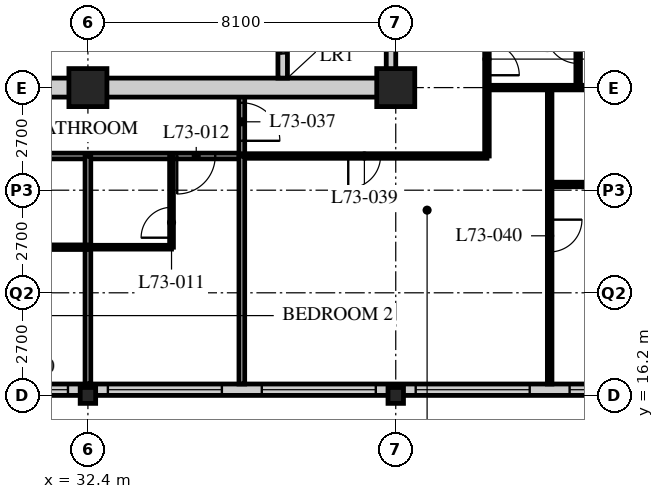
"""IFC4 building model, lengths in metres.
Left out: names, types, materials, properties, quantities, classifications, styles, units other than length and angle.
Written with IfcOpenShell. Run it as: python <this file> out.ifc"""

import sys

from ifc_helpers import new_model, si_unit, direction, frame, frame_2d, origin, origin_2d, place, context, subcontext, project, spatial, rectangle, hollow_rectangle, i_section, extrude, element, fill, save


model = new_model("IFC4")
c1 = context("Model", 3, precision=1e-05, world=origin(), true_north=direction((0.0, 1.0)))
c2 = subcontext(c1, "Body", "Model", "MODEL_VIEW")
j1 = project(units=[si_unit("LENGTHUNIT", "METRE"), si_unit("PLANEANGLEUNIT", "RADIAN")], contexts=[c1])
p1 = place(None, origin())
s1 = spatial("IfcSite", under=j1, at=p1, CompositionType="ELEMENT")
p2 = place(p1, origin())
s2 = spatial("IfcBuilding", under=s1, at=p2, CompositionType="ELEMENT")
p3 = place(p2, frame((0.0, 0.0, 285.3)))
s3 = spatial("IfcBuildingStorey", under=s2, at=p3, CompositionType="ELEMENT", Elevation=285.3)
p4 = place(p3, frame((32.4, 16.2, 0.0), z_axis=(0.0, 0.0, 1.0), x_axis=(1.0, 0.0, 0.0)))
e1 = element("IfcColumn", 1, at=p4, inside=s3, PredefinedType="COLUMN", context=c2, shape_type="SweptSolid", body=[
    extrude(i_section(OverallWidth=0.407, OverallDepth=0.419, WebThickness=0.031, FlangeThickness=0.049, FilletRadius=0.015, at=origin_2d()), origin(), (0.0, 0.0, 1.0), 3.9),
])
p5 = place(p3, frame((32.4, 24.3, 0.0), z_axis=(0.0, 0.0, 1.0), x_axis=(1.0, 0.0, 0.0)))
e2 = element("IfcColumn", 2, at=p5, inside=s3, PredefinedType="COLUMN", context=c2, shape_type="SweptSolid", body=[
    extrude(hollow_rectangle(XDim=1.0, YDim=1.0, WallThickness=0.1, at=origin_2d()), origin(), (0.0, 0.0, 1.0), 3.9),
])
p6 = place(p3, frame((40.5, 16.2, 0.0), z_axis=(0.0, 0.0, 1.0), x_axis=(1.0, 0.0, 0.0)))
e3 = element("IfcColumn", 3, at=p6, inside=s3, PredefinedType="COLUMN", context=c2, shape_type="SweptSolid", body=[
    extrude(i_section(OverallWidth=0.407, OverallDepth=0.419, WebThickness=0.031, FlangeThickness=0.049, FilletRadius=0.015, at=origin_2d()), origin(), (0.0, 0.0, 1.0), 3.9),
])
p7 = place(p3, frame((40.5, 24.3, 0.0), z_axis=(0.0, 0.0, 1.0), x_axis=(1.0, 0.0, 0.0)))
e4 = element("IfcColumn", 4, at=p7, inside=s3, PredefinedType="COLUMN", context=c2, shape_type="SweptSolid", body=[
    extrude(hollow_rectangle(XDim=1.0, YDim=1.0, WallThickness=0.1, at=origin_2d()), origin(), (0.0, 0.0, 1.0), 3.9),
])
p8 = place(p3, frame((8.4, 16.35, 0.0), z_axis=(0.0, 0.0, 1.0), x_axis=(1.0, 0.0, 0.0)))
e5 = element("IfcWall", 5, at=p8, inside=s3, PredefinedType="SOLIDWALL", context=c2, shape_type="SweptSolid", body=[
    extrude(rectangle(XDim=40.2, YDim=0.3, at=frame_2d((20.1, 0.0))), origin(), (0.0, 0.0, 1.0), 3.69),
])
p9 = place(p8, frame((0.225, 0.0, 0.6)))
e6 = element("IfcOpeningElement", 6, at=p9, cuts=e5, PredefinedType="OPENING", context=c2, shape_type="SweptSolid", body=[
    extrude(rectangle(XDim=3.0, YDim=2.4, at=frame_2d((1.5, 1.2))), frame((0.0, 0.16, 0.0), z_axis=(0.0, -1.0, 0.0), x_axis=(1.0, 0.0, 0.0)), (0.0, 0.0, 1.0), 0.32),
])
p10 = place(p8, frame((4.275, 0.0, 0.6)))
e7 = element("IfcOpeningElement", 7, at=p10, cuts=e5, PredefinedType="OPENING", context=c2, shape_type="SweptSolid", body=[
    extrude(rectangle(XDim=3.0, YDim=2.4, at=frame_2d((1.5, 1.2))), frame((0.0, 0.16, 0.0), z_axis=(0.0, -1.0, 0.0), x_axis=(1.0, 0.0, 0.0)), (0.0, 0.0, 1.0), 0.32),
])
p11 = place(p8, frame((8.325, 0.0, 0.6)))
e8 = element("IfcOpeningElement", 8, at=p11, cuts=e5, PredefinedType="OPENING", context=c2, shape_type="SweptSolid", body=[
    extrude(rectangle(XDim=3.0, YDim=2.4, at=frame_2d((1.5, 1.2))), frame((0.0, 0.16, 0.0), z_axis=(0.0, -1.0, 0.0), x_axis=(1.0, 0.0, 0.0)), (0.0, 0.0, 1.0), 0.32),
])
p12 = place(p8, frame((12.375, 0.0, 0.6)))
e9 = element("IfcOpeningElement", 9, at=p12, cuts=e5, PredefinedType="OPENING", context=c2, shape_type="SweptSolid", body=[
    extrude(rectangle(XDim=3.0, YDim=2.4, at=frame_2d((1.5, 1.2))), frame((0.0, 0.16, 0.0), z_axis=(0.0, -1.0, 0.0), x_axis=(1.0, 0.0, 0.0)), (0.0, 0.0, 1.0), 0.32),
])
p13 = place(p8, frame((16.425, 0.0, 0.6)))
e10 = element("IfcOpeningElement", 10, at=p13, cuts=e5, PredefinedType="OPENING", context=c2, shape_type="SweptSolid", body=[
    extrude(rectangle(XDim=3.0, YDim=2.4, at=frame_2d((1.5, 1.2))), frame((0.0, 0.16, 0.0), z_axis=(0.0, -1.0, 0.0), x_axis=(1.0, 0.0, 0.0)), (0.0, 0.0, 1.0), 0.32),
])
p14 = place(p8, frame((20.475, 0.0, 0.6)))
e11 = element("IfcOpeningElement", 11, at=p14, cuts=e5, PredefinedType="OPENING", context=c2, shape_type="SweptSolid", body=[
    extrude(rectangle(XDim=3.0, YDim=2.4, at=frame_2d((1.5, 1.2))), frame((0.0, 0.16, 0.0), z_axis=(0.0, -1.0, 0.0), x_axis=(1.0, 0.0, 0.0)), (0.0, 0.0, 1.0), 0.32),
])
p15 = place(p8, frame((24.525, 0.0, 0.6)))
e12 = element("IfcOpeningElement", 12, at=p15, cuts=e5, PredefinedType="OPENING", context=c2, shape_type="SweptSolid", body=[
    extrude(rectangle(XDim=3.0, YDim=2.4, at=frame_2d((1.5, 1.2))), frame((0.0, 0.16, 0.0), z_axis=(0.0, -1.0, 0.0), x_axis=(1.0, 0.0, 0.0)), (0.0, 0.0, 1.0), 0.32),
])
p16 = place(p8, frame((28.575, 0.0, 0.6)))
e13 = element("IfcOpeningElement", 13, at=p16, cuts=e5, PredefinedType="OPENING", context=c2, shape_type="SweptSolid", body=[
    extrude(rectangle(XDim=3.0, YDim=2.4, at=frame_2d((1.5, 1.2))), frame((0.0, 0.16, 0.0), z_axis=(0.0, -1.0, 0.0), x_axis=(1.0, 0.0, 0.0)), (0.0, 0.0, 1.0), 0.32),
])
p17 = place(p8, frame((32.625, 0.0, 0.6)))
e14 = element("IfcOpeningElement", 14, at=p17, cuts=e5, PredefinedType="OPENING", context=c2, shape_type="SweptSolid", body=[
    extrude(rectangle(XDim=3.0, YDim=2.4, at=frame_2d((1.5, 1.2))), frame((0.0, 0.16, 0.0), z_axis=(0.0, -1.0, 0.0), x_axis=(1.0, 0.0, 0.0)), (0.0, 0.0, 1.0), 0.32),
])
p18 = place(p8, frame((36.675, 0.0, 0.6)))
e15 = element("IfcOpeningElement", 15, at=p18, cuts=e5, PredefinedType="OPENING", context=c2, shape_type="SweptSolid", body=[
    extrude(rectangle(XDim=3.0, YDim=2.4, at=frame_2d((1.5, 1.2))), frame((0.0, 0.16, 0.0), z_axis=(0.0, -1.0, 0.0), x_axis=(1.0, 0.0, 0.0)), (0.0, 0.0, 1.0), 0.32),
])
p19 = place(p3, frame((12.15, 22.5, 0.0), z_axis=(0.0, 0.0, 1.0), x_axis=(1.0, 0.0, 0.0)))
e16 = element("IfcWall", 16, at=p19, inside=s3, PredefinedType="PARTITIONING", context=c2, shape_type="SweptSolid", body=[
    extrude(rectangle(XDim=24.3, YDim=0.15, at=frame_2d((12.15, 0.0))), origin(), (0.0, 0.0, 1.0), 3.69),
])
p20 = place(p19, frame((4.45, 0.0, 0.0)))
e17 = element("IfcOpeningElement", 17, at=p20, cuts=e16, PredefinedType="OPENING", context=c2, shape_type="SweptSolid", body=[
    extrude(rectangle(XDim=1.0, YDim=2.1, at=frame_2d((0.5, 1.05))), frame((0.0, 0.085, 0.0), z_axis=(0.0, -1.0, 0.0), x_axis=(1.0, 0.0, 0.0)), (0.0, 0.0, 1.0), 0.17),
])
p21 = place(p19, frame((22.6, 0.0, 0.0)))
e18 = element("IfcOpeningElement", 18, at=p21, cuts=e16, PredefinedType="OPENING", context=c2, shape_type="SweptSolid", body=[
    extrude(rectangle(XDim=1.0, YDim=2.1, at=frame_2d((0.5, 1.05))), frame((0.0, 0.085, 0.0), z_axis=(0.0, -1.0, 0.0), x_axis=(1.0, 0.0, 0.0)), (0.0, 0.0, 1.0), 0.17),
])
p22 = place(p19, frame((2.625, 0.0, 0.0)))
e19 = element("IfcOpeningElement", 19, at=p22, cuts=e16, PredefinedType="OPENING", context=c2, shape_type="SweptSolid", body=[
    extrude(rectangle(XDim=1.0, YDim=2.1, at=frame_2d((0.5, 1.05))), frame((0.0, 0.085, 0.0), z_axis=(0.0, -1.0, 0.0), x_axis=(1.0, 0.0, 0.0)), (0.0, 0.0, 1.0), 0.17),
])
p23 = place(p3, frame((36.45, 22.5, 0.0), z_axis=(0.0, 0.0, 1.0), x_axis=(0.0, 1.0, 0.0)))
e20 = element("IfcWall", 20, at=p23, inside=s3, PredefinedType="PARTITIONING", context=c2, shape_type="SweptSolid", body=[
    extrude(rectangle(XDim=1.8, YDim=0.15, at=frame_2d((0.9, 0.0))), origin(), (0.0, 0.0, 1.0), 3.69),
])
p24 = place(p23, frame((0.4, 0.0, 0.0)))
e21 = element("IfcOpeningElement", 21, at=p24, cuts=e20, PredefinedType="OPENING", context=c2, shape_type="SweptSolid", body=[
    extrude(rectangle(XDim=1.0, YDim=2.1, at=frame_2d((0.5, 1.05))), frame((0.0, 0.085, 0.0), z_axis=(0.0, -1.0, 0.0), x_axis=(1.0, 0.0, 0.0)), (0.0, 0.0, 1.0), 0.17),
])
p25 = place(p3, frame((32.4, 22.5, 0.0), z_axis=(0.0, 0.0, 1.0), x_axis=(0.0, -1.0, 0.0)))
e22 = element("IfcWall", 22, at=p25, inside=s3, PredefinedType="PARTITIONING", context=c2, shape_type="SweptSolid", body=[
    extrude(rectangle(XDim=6.0, YDim=0.15, at=frame_2d((3.0, 0.0))), origin(), (0.0, 0.0, 1.0), 3.078),
])
p26 = place(p3, frame((32.4, 20.1, 0.0), z_axis=(0.0, 0.0, 1.0), x_axis=(1.0, 0.0, 0.0)))
e23 = element("IfcWall", 23, at=p26, inside=s3, PredefinedType="PARTITIONING", context=c2, shape_type="SweptSolid", body=[
    extrude(rectangle(XDim=2.2, YDim=0.1, at=frame_2d((1.1, 0.0))), origin(), (0.0, 0.0, 1.0), 3.69),
])
p27 = place(p3, frame((34.6, 22.5, 0.0), z_axis=(0.0, 0.0, 1.0), x_axis=(0.0, -1.0, 0.0)))
e24 = element("IfcWall", 24, at=p27, inside=s3, PredefinedType="PARTITIONING", context=c2, shape_type="SweptSolid", body=[
    extrude(rectangle(XDim=2.4, YDim=0.1, at=frame_2d((1.2, 0.0))), origin(), (0.0, 0.0, 1.0), 3.69),
])
p28 = place(p27, frame((1.35, 0.0, 0.0)))
e25 = element("IfcOpeningElement", 25, at=p28, cuts=e24, PredefinedType="OPENING", context=c2, shape_type="SweptSolid", body=[
    extrude(rectangle(XDim=0.8, YDim=2.1, at=frame_2d((0.4, 1.05))), frame((0.0, 0.06, 0.0), z_axis=(0.0, -1.0, 0.0), x_axis=(1.0, 0.0, 0.0)), (0.0, 0.0, 1.0), 0.12),
])
p29 = place(p3, frame((12.15, 20.1, 0.0), z_axis=(0.0, 0.0, 1.0), x_axis=(1.0, 0.0, 0.0)))
e26 = element("IfcWall", 26, at=p29, inside=s3, PredefinedType="PARTITIONING", context=c2, shape_type="SweptSolid", body=[
    extrude(rectangle(XDim=20.25, YDim=0.12, at=frame_2d((10.125, 0.0))), origin(), (0.0, 0.0, 1.0), 3.69),
])
p30 = place(p29, frame((5.025, 0.0, 0.0)))
e27 = element("IfcOpeningElement", 27, at=p30, cuts=e26, PredefinedType="OPENING", context=c2, shape_type="SweptSolid", body=[
    extrude(rectangle(XDim=0.85, YDim=2.1, at=frame_2d((0.425, 1.05))), frame((0.0, 0.07, 0.0), z_axis=(0.0, -1.0, 0.0), x_axis=(1.0, 0.0, 0.0)), (0.0, 0.0, 1.0), 0.14),
])
p31 = place(p29, frame((12.475, 0.0, 0.0)))
e28 = element("IfcOpeningElement", 28, at=p31, cuts=e26, PredefinedType="OPENING", context=c2, shape_type="SweptSolid", body=[
    extrude(rectangle(XDim=0.85, YDim=2.1, at=frame_2d((0.425, 1.05))), frame((0.0, 0.07, 0.0), z_axis=(0.0, -1.0, 0.0), x_axis=(1.0, 0.0, 0.0)), (0.0, 0.0, 1.0), 0.14),
])
p32 = place(p29, frame((16.525, 0.0, 0.0)))
e29 = element("IfcOpeningElement", 29, at=p32, cuts=e26, PredefinedType="OPENING", context=c2, shape_type="SweptSolid", body=[
    extrude(rectangle(XDim=0.85, YDim=2.1, at=frame_2d((0.425, 1.05))), frame((0.0, 0.07, 0.0), z_axis=(0.0, -1.0, 0.0), x_axis=(1.0, 0.0, 0.0)), (0.0, 0.0, 1.0), 0.14),
])
p33 = place(p29, frame((2.725, 0.0, 0.0)))
e30 = element("IfcOpeningElement", 30, at=p33, cuts=e26, PredefinedType="OPENING", context=c2, shape_type="SweptSolid", body=[
    extrude(rectangle(XDim=0.85, YDim=2.1, at=frame_2d((0.425, 1.05))), frame((0.0, 0.07, 0.0), z_axis=(0.0, -1.0, 0.0), x_axis=(1.0, 0.0, 0.0)), (0.0, 0.0, 1.0), 0.14),
])
p34 = place(p3, frame((42.9, 22.5, 0.0), z_axis=(0.0, 0.0, 1.0), x_axis=(0.0, 1.0, 0.0)))
e31 = element("IfcWall", 31, at=p34, inside=s3, PredefinedType="PARTITIONING", context=c2, shape_type="SweptSolid", body=[
    extrude(rectangle(XDim=13.95, YDim=0.12, at=frame_2d((6.975, 0.0))), origin(), (0.0, 0.0, 1.0), 3.69),
])
p35 = place(p34, frame((2.125, 0.0, 0.0)))
e32 = element("IfcOpeningElement", 32, at=p35, cuts=e31, PredefinedType="OPENING", context=c2, shape_type="SweptSolid", body=[
    extrude(rectangle(XDim=0.85, YDim=2.1, at=frame_2d((0.425, 1.05))), frame((0.0, 0.07, 0.0), z_axis=(0.0, -1.0, 0.0), x_axis=(1.0, 0.0, 0.0)), (0.0, 0.0, 1.0), 0.14),
])
p36 = place(p34, frame((6.175, 0.0, 0.0)))
e33 = element("IfcOpeningElement", 33, at=p36, cuts=e31, PredefinedType="OPENING", context=c2, shape_type="SweptSolid", body=[
    extrude(rectangle(XDim=0.85, YDim=2.1, at=frame_2d((0.425, 1.05))), frame((0.0, 0.07, 0.0), z_axis=(0.0, -1.0, 0.0), x_axis=(1.0, 0.0, 0.0)), (0.0, 0.0, 1.0), 0.14),
])
p37 = place(p34, frame((10.225, 0.0, 0.0)))
e34 = element("IfcOpeningElement", 34, at=p37, cuts=e31, PredefinedType="OPENING", context=c2, shape_type="SweptSolid", body=[
    extrude(rectangle(XDim=0.85, YDim=2.1, at=frame_2d((0.425, 1.05))), frame((0.0, 0.07, 0.0), z_axis=(0.0, -1.0, 0.0), x_axis=(1.0, 0.0, 0.0)), (0.0, 0.0, 1.0), 0.14),
])
p38 = place(p3, frame((36.45, 22.5, 0.0), z_axis=(0.0, 0.0, 1.0), x_axis=(1.0, 0.0, 0.0)))
e35 = element("IfcWall", 35, at=p38, inside=s3, PredefinedType="PARTITIONING", context=c2, shape_type="SweptSolid", body=[
    extrude(rectangle(XDim=6.45, YDim=0.12, at=frame_2d((3.225, 0.0))), origin(), (0.0, 0.0, 1.0), 3.69),
])
p39 = place(p38, frame((2.8, 0.0, 0.0)))
e36 = element("IfcOpeningElement", 36, at=p39, cuts=e35, PredefinedType="OPENING", context=c2, shape_type="SweptSolid", body=[
    extrude(rectangle(XDim=0.85, YDim=2.1, at=frame_2d((0.425, 1.05))), frame((0.0, 0.07, 0.0), z_axis=(0.0, -1.0, 0.0), x_axis=(1.0, 0.0, 0.0)), (0.0, 0.0, 1.0), 0.14),
])
p40 = place(p3, frame((42.9, 24.3, 0.0), z_axis=(0.0, 0.0, 1.0), x_axis=(1.0, 0.0, 0.0)))
e37 = element("IfcWall", 37, at=p40, inside=s3, PredefinedType="PARTITIONING", context=c2, shape_type="SweptSolid", body=[
    extrude(rectangle(XDim=9.45, YDim=0.12, at=frame_2d((4.725, 0.0))), origin(), (0.0, 0.0, 1.0), 3.078),
])
p41 = place(p3, frame((36.45, 16.5, 0.0), z_axis=(0.0, 0.0, 1.0), x_axis=(0.0, 1.0, 0.0)))
e38 = element("IfcWall", 38, at=p41, inside=s3, PredefinedType="PARTITIONING", context=c2, shape_type="SweptSolid", body=[
    extrude(rectangle(XDim=6.0, YDim=0.15, at=frame_2d((3.0, 0.0))), origin(), (0.0, 0.0, 1.0), 3.69),
])
p42 = place(p3, frame((44.55, 16.5, 0.0), z_axis=(0.0, 0.0, 1.0), x_axis=(0.0, 1.0, 0.0)))
e39 = element("IfcWall", 39, at=p42, inside=s3, PredefinedType="PARTITIONING", context=c2, shape_type="SweptSolid", body=[
    extrude(rectangle(XDim=7.8, YDim=0.12, at=frame_2d((3.9, 0.0))), origin(), (0.0, 0.0, 1.0), 3.69),
])
p43 = place(p42, frame((3.475, 0.0, 0.0)))
e40 = element("IfcOpeningElement", 40, at=p43, cuts=e39, PredefinedType="OPENING", context=c2, shape_type="SweptSolid", body=[
    extrude(rectangle(XDim=0.85, YDim=2.1, at=frame_2d((0.425, 1.05))), frame((0.0, 0.07, 0.0), z_axis=(0.0, -1.0, 0.0), x_axis=(1.0, 0.0, 0.0)), (0.0, 0.0, 1.0), 0.14),
])
p44 = place(p3, frame((45.3, 24.3, 0.0), z_axis=(0.0, 0.0, 1.0), x_axis=(0.0, 1.0, 0.0)))
e41 = element("IfcWall", 41, at=p44, inside=s3, PredefinedType="PARTITIONING", context=c2, shape_type="SweptSolid", body=[
    extrude(rectangle(XDim=1.76, YDim=0.12, at=frame_2d((0.88, 0.0))), origin(), (0.0, 0.0, 1.0), 3.69),
])
p45 = place(p44, frame((0.635, 0.0, 0.0)))
e42 = element("IfcOpeningElement", 42, at=p45, cuts=e41, PredefinedType="OPENING", context=c2, shape_type="SweptSolid", body=[
    extrude(rectangle(XDim=0.85, YDim=2.1, at=frame_2d((0.425, 1.05))), frame((0.0, 0.07, 0.0), z_axis=(0.0, -1.0, 0.0), x_axis=(1.0, 0.0, 0.0)), (0.0, 0.0, 1.0), 0.14),
])
p46 = place(p3, frame((44.55, 21.75, 0.0), z_axis=(0.0, 0.0, 1.0), x_axis=(1.0, 0.0, 0.0)))
e43 = element("IfcWall", 43, at=p46, inside=s3, PredefinedType="PARTITIONING", context=c2, shape_type="SweptSolid", body=[
    extrude(rectangle(XDim=7.8, YDim=0.12, at=frame_2d((3.9, 0.0))), origin(), (0.0, 0.0, 1.0), 3.69),
])
p47 = place(p46, frame((3.475, 0.0, 0.0)))
e44 = element("IfcOpeningElement", 44, at=p47, cuts=e43, PredefinedType="OPENING", context=c2, shape_type="SweptSolid", body=[
    extrude(rectangle(XDim=0.85, YDim=2.1, at=frame_2d((0.425, 1.05))), frame((0.0, 0.07, 0.0), z_axis=(0.0, -1.0, 0.0), x_axis=(1.0, 0.0, 0.0)), (0.0, 0.0, 1.0), 0.14),
])
p48 = place(p3, frame((15.95, 24.3, 0.0), z_axis=(0.0, 0.0, 1.0), x_axis=(1.0, 0.0, 0.0)))
e45 = element("IfcWall", 45, at=p48, inside=s3, PredefinedType="SOLIDWALL", context=c2, shape_type="SweptSolid", body=[
    extrude(rectangle(XDim=24.55, YDim=0.5, at=frame_2d((12.275, 0.0))), origin(), (0.0, 0.0, 1.0), 3.04),
])
p49 = place(p48, frame((11.5, 0.0, 0.0)))
e46 = element("IfcOpeningElement", 46, at=p49, cuts=e45, PredefinedType="OPENING", context=c2, shape_type="SweptSolid", body=[
    extrude(rectangle(XDim=1.8, YDim=2.4, at=frame_2d((0.9, 1.2))), frame((0.0, 0.26, 0.0), z_axis=(0.0, -1.0, 0.0), x_axis=(1.0, 0.0, 0.0)), (0.0, 0.0, 1.0), 0.52),
])
p50 = place(p3, frame((40.375, 24.55, 0.0), z_axis=(0.0, 0.0, 1.0), x_axis=(0.0, 1.0, 0.0)))
e47 = element("IfcWall", 47, at=p50, inside=s3, PredefinedType="SOLIDWALL", context=c2, shape_type="SweptSolid", body=[
    extrude(rectangle(XDim=15.7, YDim=0.25, at=frame_2d((7.85, 0.0))), origin(), (0.0, 0.0, 1.0), 3.078),
])
p51 = place(p3, frame((37.525, 24.55, 0.0), z_axis=(0.0, 0.0, 1.0), x_axis=(0.0, 1.0, 0.0)))
e48 = element("IfcWall", 48, at=p51, inside=s3, PredefinedType="SOLIDWALL", context=c2, shape_type="SweptSolid", body=[
    extrude(rectangle(XDim=7.75, YDim=0.25, at=frame_2d((3.875, 0.0))), origin(), (0.0, 0.0, 1.0), 3.69),
])
p52 = place(p51, frame((0.65, 0.0, 0.0)))
e49 = element("IfcOpeningElement", 49, at=p52, cuts=e48, PredefinedType="OPENING", context=c2, shape_type="SweptSolid", body=[
    extrude(rectangle(XDim=1.1, YDim=2.4, at=frame_2d((0.55, 1.2))), frame((0.0, 0.135, 0.0), z_axis=(0.0, -1.0, 0.0), x_axis=(1.0, 0.0, 0.0)), (0.0, 0.0, 1.0), 0.27),
])
p53 = place(p51, frame((3.25, 0.0, 0.0)))
e50 = element("IfcOpeningElement", 50, at=p53, cuts=e48, PredefinedType="OPENING", context=c2, shape_type="SweptSolid", body=[
    extrude(rectangle(XDim=1.1, YDim=2.4, at=frame_2d((0.55, 1.2))), frame((0.0, 0.135, 0.0), z_axis=(0.0, -1.0, 0.0), x_axis=(1.0, 0.0, 0.0)), (0.0, 0.0, 1.0), 0.27),
])
p54 = place(p51, frame((5.85, 0.0, 0.0)))
e51 = element("IfcOpeningElement", 51, at=p54, cuts=e48, PredefinedType="OPENING", context=c2, shape_type="SweptSolid", body=[
    extrude(rectangle(XDim=1.1, YDim=2.4, at=frame_2d((0.55, 1.2))), frame((0.0, 0.135, 0.0), z_axis=(0.0, -1.0, 0.0), x_axis=(1.0, 0.0, 0.0)), (0.0, 0.0, 1.0), 0.27),
])
p55 = place(p14, origin())
e52 = element("IfcWindow", 52, at=p55, inside=s3, PartitioningType="SINGLE_PANEL", PredefinedType="WINDOW", context=c2, shape_type="SweptSolid", body=[
    extrude(rectangle(XDim=3.0, YDim=2.4, at=frame_2d((1.5, 1.2))), frame((0.0, 0.03, 0.0), z_axis=(0.0, -1.0, 0.0), x_axis=(1.0, 0.0, 0.0)), (0.0, 0.0, 1.0), 0.06),
])
fill(e11, e52)
p56 = place(p15, origin())
e53 = element("IfcWindow", 53, at=p56, inside=s3, PartitioningType="SINGLE_PANEL", PredefinedType="WINDOW", context=c2, shape_type="SweptSolid", body=[
    extrude(rectangle(XDim=3.0, YDim=2.4, at=frame_2d((1.5, 1.2))), frame((0.0, 0.03, 0.0), z_axis=(0.0, -1.0, 0.0), x_axis=(1.0, 0.0, 0.0)), (0.0, 0.0, 1.0), 0.06),
])
fill(e12, e53)
p57 = place(p16, origin())
e54 = element("IfcWindow", 54, at=p57, inside=s3, PartitioningType="SINGLE_PANEL", PredefinedType="WINDOW", context=c2, shape_type="SweptSolid", body=[
    extrude(rectangle(XDim=3.0, YDim=2.4, at=frame_2d((1.5, 1.2))), frame((0.0, 0.03, 0.0), z_axis=(0.0, -1.0, 0.0), x_axis=(1.0, 0.0, 0.0)), (0.0, 0.0, 1.0), 0.06),
])
fill(e13, e54)
p58 = place(p17, origin())
e55 = element("IfcWindow", 55, at=p58, inside=s3, PartitioningType="SINGLE_PANEL", PredefinedType="WINDOW", context=c2, shape_type="SweptSolid", body=[
    extrude(rectangle(XDim=3.0, YDim=2.4, at=frame_2d((1.5, 1.2))), frame((0.0, 0.03, 0.0), z_axis=(0.0, -1.0, 0.0), x_axis=(1.0, 0.0, 0.0)), (0.0, 0.0, 1.0), 0.06),
])
fill(e14, e55)
p59 = place(p18, origin())
e56 = element("IfcWindow", 56, at=p59, inside=s3, PartitioningType="SINGLE_PANEL", PredefinedType="WINDOW", context=c2, shape_type="SweptSolid", body=[
    extrude(rectangle(XDim=3.0, YDim=2.4, at=frame_2d((1.5, 1.2))), frame((0.0, 0.03, 0.0), z_axis=(0.0, -1.0, 0.0), x_axis=(1.0, 0.0, 0.0)), (0.0, 0.0, 1.0), 0.06),
])
fill(e15, e56)
p60 = place(p28, origin())
e57 = element("IfcDoor", 57, at=p60, inside=s3, OperationType="SINGLE_SWING_LEFT", PredefinedType="DOOR", context=c2, shape_type="SweptSolid", body=[
    extrude(rectangle(XDim=0.8, YDim=2.1, at=frame_2d((0.4, 1.05))), frame((0.0, 0.025, 0.0), z_axis=(0.0, -1.0, 0.0), x_axis=(1.0, 0.0, 0.0)), (0.0, 0.0, 1.0), 0.05),
])
fill(e25, e57)
p61 = place(p21, origin())
e58 = element("IfcDoor", 58, at=p61, inside=s3, OperationType="SINGLE_SWING_RIGHT", PredefinedType="DOOR", context=c2, shape_type="SweptSolid", body=[
    extrude(rectangle(XDim=1.0, YDim=2.1, at=frame_2d((0.5, 1.05))), frame((0.0, 0.025, 0.0), z_axis=(0.0, -1.0, 0.0), x_axis=(1.0, 0.0, 0.0)), (0.0, 0.0, 1.0), 0.05),
])
fill(e18, e58)
p62 = place(p24, origin())
e59 = element("IfcDoor", 59, at=p62, inside=s3, OperationType="SINGLE_SWING_RIGHT", PredefinedType="DOOR", context=c2, shape_type="SweptSolid", body=[
    extrude(rectangle(XDim=1.0, YDim=2.1, at=frame_2d((0.5, 1.05))), frame((0.0, 0.025, 0.0), z_axis=(0.0, -1.0, 0.0), x_axis=(1.0, 0.0, 0.0)), (0.0, 0.0, 1.0), 0.05),
])
fill(e21, e59)
p63 = place(p39, origin())
e60 = element("IfcDoor", 60, at=p63, inside=s3, OperationType="SINGLE_SWING_RIGHT", PredefinedType="DOOR", context=c2, shape_type="SweptSolid", body=[
    extrude(rectangle(XDim=0.85, YDim=2.1, at=frame_2d((0.425, 1.05))), frame((0.0, 0.025, 0.0), z_axis=(0.0, -1.0, 0.0), x_axis=(1.0, 0.0, 0.0)), (0.0, 0.0, 1.0), 0.05),
])
fill(e36, e60)
p64 = place(p43, origin())
e61 = element("IfcDoor", 61, at=p64, inside=s3, OperationType="SINGLE_SWING_LEFT", PredefinedType="DOOR", context=c2, shape_type="SweptSolid", body=[
    extrude(rectangle(XDim=0.85, YDim=2.1, at=frame_2d((0.425, 1.05))), frame((0.0, 0.025, 0.0), z_axis=(0.0, -1.0, 0.0), x_axis=(1.0, 0.0, 0.0)), (0.0, 0.0, 1.0), 0.05),
])
fill(e40, e61)
p65 = place(p35, origin())
e62 = element("IfcDoor", 62, at=p65, inside=s3, OperationType="SINGLE_SWING_RIGHT", PredefinedType="DOOR", context=c2, shape_type="SweptSolid", body=[
    extrude(rectangle(XDim=0.85, YDim=2.1, at=frame_2d((0.425, 1.05))), frame((0.0, 0.025, 0.0), z_axis=(0.0, -1.0, 0.0), x_axis=(1.0, 0.0, 0.0)), (0.0, 0.0, 1.0), 0.05),
])
fill(e32, e62)
p66 = place(p45, origin())
e63 = element("IfcDoor", 63, at=p66, inside=s3, OperationType="SINGLE_SWING_RIGHT", PredefinedType="DOOR", context=c2, shape_type="SweptSolid", body=[
    extrude(rectangle(XDim=0.85, YDim=2.1, at=frame_2d((0.425, 1.05))), frame((0.0, 0.025, 0.0), z_axis=(0.0, -1.0, 0.0), x_axis=(1.0, 0.0, 0.0)), (0.0, 0.0, 1.0), 0.05),
])
fill(e42, e63)
p67 = place(p52, origin())
e64 = element("IfcDoor", 64, at=p67, inside=s3, OperationType="DOUBLE_DOOR_SLIDING", PredefinedType="DOOR", context=c2, shape_type="SweptSolid", body=[
    extrude(rectangle(XDim=1.1, YDim=2.4, at=frame_2d((0.55, 1.2))), frame((0.0, 0.025, 0.0), z_axis=(0.0, -1.0, 0.0), x_axis=(1.0, 0.0, 0.0)), (0.0, 0.0, 1.0), 0.05),
])
fill(e49, e64)
save(model, sys.argv[1])
